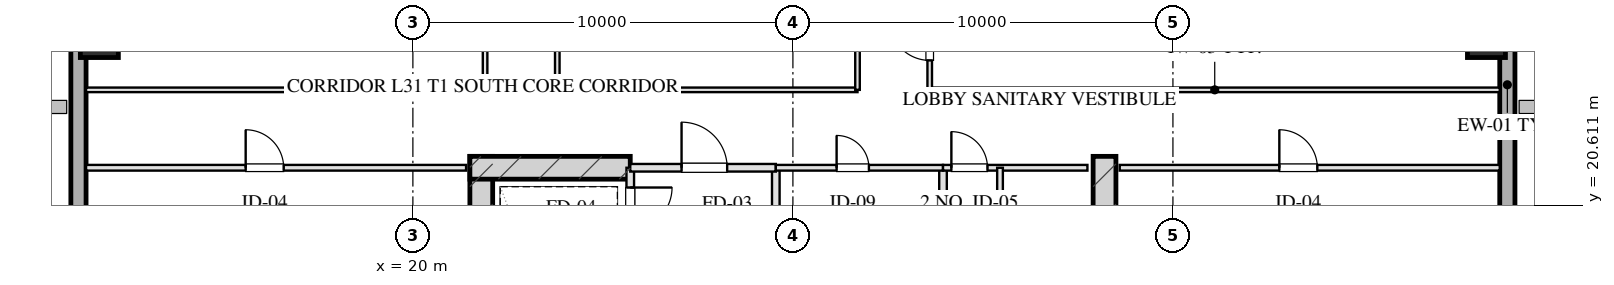
"""IFC4 building model, lengths in metres.
Left out: names, types, materials, properties, quantities, classifications, styles, units other than length and angle.
Written with IfcOpenShell. Run it as: python <this file> out.ifc"""

import sys

from ifc_helpers import new_model, si_unit, direction, frame, frame_2d, origin, origin_2d, place, context, subcontext, project, spatial, rectangle, hollow_rectangle, extrude, element, fill, save


model = new_model("IFC4")
c1 = context("Model", 3, precision=1e-05, world=origin(), true_north=direction((0.0, 1.0)))
c2 = subcontext(c1, "Body", "Model", "MODEL_VIEW")
j1 = project(units=[si_unit("LENGTHUNIT", "METRE"), si_unit("PLANEANGLEUNIT", "RADIAN")], contexts=[c1])
p1 = place(None, origin())
s1 = spatial("IfcSite", under=j1, at=p1, CompositionType="ELEMENT")
p2 = place(p1, origin())
s2 = spatial("IfcBuilding", under=s1, at=p2, CompositionType="ELEMENT")
p3 = place(p2, frame((0.0, 0.0, 120.75)))
s3 = spatial("IfcBuildingStorey", under=s2, at=p3, CompositionType="ELEMENT", Elevation=120.75)
for number, where, z_axis, x_axis in (
    (1, (21.8, 21.9, 0.0), (0.0, 0.0, 1.0), (0.0, -1.0, 0.0)),
    (2, (38.2, 21.9, 0.0), (0.0, 0.0, 1.0), (0.0, -1.0, 0.0)),
):
    element("IfcWall", number, at=place(p3, frame(where, z_axis=z_axis, x_axis=x_axis)), inside=s3, PredefinedType="SHEAR", context=c2, shape_type="SweptSolid", body=[
        extrude(rectangle(XDim=9.48, YDim=0.6, at=frame_2d((4.74, 0.0))), origin(), (0.0, 0.0, 1.0), 3.45),
    ])
p4 = place(p3, frame((21.5, 21.6, 0.0), z_axis=(0.0, 0.0, 1.0), x_axis=(1.0, 0.0, 0.0)))
e3 = element("IfcWall", 3, at=p4, inside=s3, PredefinedType="SHEAR", context=c2, shape_type="SweptSolid", body=[
    extrude(rectangle(XDim=4.22, YDim=0.6, at=frame_2d((2.11, 0.0))), origin(), (0.0, 0.0, 1.0), 3.45),
])
for number, where, z_axis, x_axis in (
    (4, (11.75, 25.0, 0.0), (0.0, 0.0, 1.0), (1.0, 0.0, 0.0)),
    (5, (48.25, 25.0, 0.0), (0.0, 0.0, 1.0), (1.0, 0.0, 0.0)),
):
    element("IfcColumn", number, at=place(p3, frame(where, z_axis=z_axis, x_axis=x_axis)), inside=s3, PredefinedType="COLUMN", context=c2, shape_type="SweptSolid", body=[
        extrude(hollow_rectangle(XDim=1.0, YDim=1.0, WallThickness=0.036, at=origin_2d()), origin(), (0.0, 0.0, 1.0), 3.451),
    ])
p5 = place(p3, frame((11.2, 9.0, 0.0), z_axis=(0.0, 0.0, 1.0), x_axis=(0.0, 1.0, 0.0)))
e6 = element("IfcWall", 6, at=p5, inside=s3, PredefinedType="SOLIDWALL", context=c2, shape_type="SweptSolid", body=[
    extrude(rectangle(XDim=50.0, YDim=0.4, at=frame_2d((25.0, 0.0))), origin(), (0.0, 0.0, 1.0), 2.61),
])
p6 = place(p5, frame((17.4, 0.0, 0.75)))
e7 = element("IfcOpeningElement", 7, at=p6, cuts=e6, PredefinedType="OPENING", context=c2, shape_type="SweptSolid", body=[
    extrude(rectangle(XDim=2.4, YDim=1.46, at=frame_2d((1.2, 0.73))), frame((0.0, 0.21, 0.0), z_axis=(0.0, -1.0, 0.0), x_axis=(1.0, 0.0, 0.0)), (0.0, 0.0, 1.0), 0.42),
])
p7 = place(p5, frame((30.25, 0.0, 0.0)))
e8 = element("IfcOpeningElement", 8, at=p7, cuts=e6, PredefinedType="OPENING", context=c2, shape_type="SweptSolid", body=[
    extrude(rectangle(XDim=1.1, YDim=2.15, at=frame_2d((0.55, 1.075))), frame((0.0, 0.21, 0.0), z_axis=(0.0, -1.0, 0.0), x_axis=(1.0, 0.0, 0.0)), (0.0, 0.0, 1.0), 0.42),
])
p8 = place(p3, frame((48.8, 59.0, 0.0), z_axis=(0.0, 0.0, 1.0), x_axis=(0.0, -1.0, 0.0)))
e9 = element("IfcWall", 9, at=p8, inside=s3, PredefinedType="SOLIDWALL", context=c2, shape_type="SweptSolid", body=[
    extrude(rectangle(XDim=50.0, YDim=0.4, at=frame_2d((25.0, 0.0))), origin(), (0.0, 0.0, 1.0), 2.61),
])
p9 = place(p8, frame((18.583, 0.0, 0.0)))
e10 = element("IfcOpeningElement", 10, at=p9, cuts=e9, PredefinedType="OPENING", context=c2, shape_type="SweptSolid", body=[
    extrude(rectangle(XDim=1.1, YDim=2.15, at=frame_2d((0.55, 1.075))), frame((0.0, 0.21, 0.0), z_axis=(0.0, -1.0, 0.0), x_axis=(1.0, 0.0, 0.0)), (0.0, 0.0, 1.0), 0.42),
])
p10 = place(p3, frame((25.72, 21.6, 0.0), z_axis=(0.0, 0.0, 1.0), x_axis=(0.0, -1.0, 0.0)))
e11 = element("IfcWall", 11, at=p10, inside=s3, PredefinedType="PARTITIONING", context=c2, shape_type="SweptSolid", body=[
    extrude(rectangle(XDim=1.9, YDim=0.2, at=frame_2d((0.95, 0.0))), origin(), (0.0, 0.0, 1.0), 3.175),
])
p11 = place(p10, frame((0.52, 0.0, 0.0)))
e12 = element("IfcOpeningElement", 12, at=p11, cuts=e11, PredefinedType="OPENING", context=c2, shape_type="SweptSolid", body=[
    extrude(rectangle(XDim=1.1, YDim=2.05, at=frame_2d((0.55, 1.025))), frame((0.0, 0.11, 0.0), z_axis=(0.0, -1.0, 0.0), x_axis=(1.0, 0.0, 0.0)), (0.0, 0.0, 1.0), 0.22),
])
p12 = place(p3, frame((29.55, 21.6, 0.0), z_axis=(0.0, 0.0, 1.0), x_axis=(0.0, -1.0, 0.0)))
e13 = element("IfcWall", 13, at=p12, inside=s3, PredefinedType="PARTITIONING", context=c2, shape_type="SweptSolid", body=[
    extrude(rectangle(XDim=8.43, YDim=0.2, at=frame_2d((4.215, 0.0))), origin(), (0.0, 0.0, 1.0), 3.175),
])
p13 = place(p3, frame((25.72, 21.6, 0.0), z_axis=(0.0, 0.0, 1.0), x_axis=(1.0, 0.0, 0.0)))
e14 = element("IfcWall", 14, at=p13, inside=s3, PredefinedType="PARTITIONING", context=c2, shape_type="SweptSolid", body=[
    extrude(rectangle(XDim=3.83, YDim=0.2, at=frame_2d((1.915, 0.0))), origin(), (0.0, 0.0, 1.0), 3.175),
])
p14 = place(p13, frame((1.35, 0.0, 0.0)))
e15 = element("IfcOpeningElement", 15, at=p14, cuts=e14, PredefinedType="OPENING", context=c2, shape_type="SweptSolid", body=[
    extrude(rectangle(XDim=1.2, YDim=2.05, at=frame_2d((0.6, 1.025))), frame((0.0, 0.11, 0.0), z_axis=(0.0, -1.0, 0.0), x_axis=(1.0, 0.0, 0.0)), (0.0, 0.0, 1.0), 0.22),
])
p15 = place(p3, frame((33.95, 21.6, 0.0), z_axis=(0.0, 0.0, 1.0), x_axis=(0.0, -1.0, 0.0)))
e16 = element("IfcWall", 16, at=p15, inside=s3, PredefinedType="PARTITIONING", context=c2, shape_type="SweptSolid", body=[
    extrude(rectangle(XDim=8.43, YDim=0.2, at=frame_2d((4.215, 0.0))), origin(), (0.0, 0.0, 1.0), 3.175),
])
p16 = place(p3, frame((29.55, 21.6, 0.0), z_axis=(0.0, 0.0, 1.0), x_axis=(1.0, 0.0, 0.0)))
e17 = element("IfcWall", 17, at=p16, inside=s3, PredefinedType="PARTITIONING", context=c2, shape_type="SweptSolid", body=[
    extrude(rectangle(XDim=4.4, YDim=0.15, at=frame_2d((2.2, 0.0))), origin(), (0.0, 0.0, 1.0), 3.175),
])
p17 = place(p16, frame((1.6, 0.0, 0.0)))
e18 = element("IfcOpeningElement", 18, at=p17, cuts=e17, PredefinedType="OPENING", context=c2, shape_type="SweptSolid", body=[
    extrude(rectangle(XDim=0.85, YDim=2.05, at=frame_2d((0.425, 1.025))), frame((0.0, 0.085, 0.0), z_axis=(0.0, -1.0, 0.0), x_axis=(1.0, 0.0, 0.0)), (0.0, 0.0, 1.0), 0.17),
])
p18 = place(p3, frame((33.95, 21.6, 0.0), z_axis=(0.0, 0.0, 1.0), x_axis=(1.0, 0.0, 0.0)))
e19 = element("IfcWall", 19, at=p18, inside=s3, PredefinedType="PARTITIONING", context=c2, shape_type="SweptSolid", body=[
    extrude(rectangle(XDim=3.8, YDim=0.15, at=frame_2d((1.9, 0.0))), origin(), (0.0, 0.0, 1.0), 3.175),
])
p19 = place(p18, frame((0.22, 0.0, 0.0)))
e20 = element("IfcOpeningElement", 20, at=p19, cuts=e19, PredefinedType="OPENING", context=c2, shape_type="SweptSolid", body=[
    extrude(rectangle(XDim=0.95, YDim=2.05, at=frame_2d((0.475, 1.025))), frame((0.0, 0.085, 0.0), z_axis=(0.0, -1.0, 0.0), x_axis=(1.0, 0.0, 0.0)), (0.0, 0.0, 1.0), 0.17),
])
p20 = place(p3, frame((35.45, 21.6, 0.0), z_axis=(0.0, 0.0, 1.0), x_axis=(0.0, -1.0, 0.0)))
e21 = element("IfcWall", 21, at=p20, inside=s3, PredefinedType="PARTITIONING", context=c2, shape_type="SweptSolid", body=[
    extrude(rectangle(XDim=8.43, YDim=0.15, at=frame_2d((4.215, 0.0))), origin(), (0.0, 0.0, 1.0), 2.815),
])
p21 = place(p20, frame((2.55, 0.0, 0.0)))
e22 = element("IfcOpeningElement", 22, at=p21, cuts=e21, PredefinedType="OPENING", context=c2, shape_type="SweptSolid", body=[
    extrude(rectangle(XDim=0.95, YDim=2.05, at=frame_2d((0.475, 1.025))), frame((0.0, 0.085, 0.0), z_axis=(0.0, -1.0, 0.0), x_axis=(1.0, 0.0, 0.0)), (0.0, 0.0, 1.0), 0.17),
])
p22 = place(p20, frame((4.7, 0.0, 0.0)))
e23 = element("IfcOpeningElement", 23, at=p22, cuts=e21, PredefinedType="OPENING", context=c2, shape_type="SweptSolid", body=[
    extrude(rectangle(XDim=0.9, YDim=2.05, at=frame_2d((0.45, 1.025))), frame((0.0, 0.085, 0.0), z_axis=(0.0, -1.0, 0.0), x_axis=(1.0, 0.0, 0.0)), (0.0, 0.0, 1.0), 0.17),
])
p23 = place(p20, frame((6.8, 0.0, 0.0)))
e24 = element("IfcOpeningElement", 24, at=p23, cuts=e21, PredefinedType="OPENING", context=c2, shape_type="SweptSolid", body=[
    extrude(rectangle(XDim=0.9, YDim=2.05, at=frame_2d((0.45, 1.025))), frame((0.0, 0.085, 0.0), z_axis=(0.0, -1.0, 0.0), x_axis=(1.0, 0.0, 0.0)), (0.0, 0.0, 1.0), 0.17),
])
p24 = place(p3, frame((11.4, 21.6, 0.0), z_axis=(0.0, 0.0, 1.0), x_axis=(1.0, 0.0, 0.0)))
e25 = element("IfcWall", 25, at=p24, inside=s3, PredefinedType="PARTITIONING", context=c2, shape_type="SweptSolid", body=[
    extrude(rectangle(XDim=10.0, YDim=0.15, at=frame_2d((5.0, 0.0))), origin(), (0.0, 0.0, 1.0), 3.175),
])
p25 = place(p24, frame((4.2, 0.0, 0.0)))
e26 = element("IfcOpeningElement", 26, at=p25, cuts=e25, PredefinedType="OPENING", context=c2, shape_type="SweptSolid", body=[
    extrude(rectangle(XDim=1.0, YDim=2.05, at=frame_2d((0.5, 1.025))), frame((0.0, 0.085, 0.0), z_axis=(0.0, -1.0, 0.0), x_axis=(1.0, 0.0, 0.0)), (0.0, 0.0, 1.0), 0.17),
])
p26 = place(p3, frame((38.6, 21.6, 0.0), z_axis=(0.0, 0.0, 1.0), x_axis=(1.0, 0.0, 0.0)))
e27 = element("IfcWall", 27, at=p26, inside=s3, PredefinedType="PARTITIONING", context=c2, shape_type="SweptSolid", body=[
    extrude(rectangle(XDim=10.0, YDim=0.15, at=frame_2d((5.0, 0.0))), origin(), (0.0, 0.0, 1.0), 3.175),
])
p27 = place(p26, frame((4.2, 0.0, 0.0)))
e28 = element("IfcOpeningElement", 28, at=p27, cuts=e27, PredefinedType="OPENING", context=c2, shape_type="SweptSolid", body=[
    extrude(rectangle(XDim=1.0, YDim=2.05, at=frame_2d((0.5, 1.025))), frame((0.0, 0.085, 0.0), z_axis=(0.0, -1.0, 0.0), x_axis=(1.0, 0.0, 0.0)), (0.0, 0.0, 1.0), 0.17),
])
p28 = place(p3, frame((11.4, 23.65, 0.0), z_axis=(0.0, 0.0, 1.0), x_axis=(1.0, 0.0, 0.0)))
e29 = element("IfcWall", 29, at=p28, inside=s3, PredefinedType="PARTITIONING", context=c2, shape_type="SweptSolid", body=[
    extrude(rectangle(XDim=10.5, YDim=0.12, at=frame_2d((5.25, 0.0))), origin(), (0.0, 0.0, 1.0), 3.175),
])
p29 = place(p3, frame((23.8, 23.65, 0.0), z_axis=(0.0, 0.0, 1.0), x_axis=(1.0, 0.0, 0.0)))
e30 = element("IfcWall", 30, at=p29, inside=s3, PredefinedType="PARTITIONING", context=c2, shape_type="SweptSolid", body=[
    extrude(rectangle(XDim=7.9, YDim=0.12, at=frame_2d((3.95, 0.0))), origin(), (0.0, 0.0, 1.0), 3.175),
])
p30 = place(p3, frame((33.6, 23.65, 0.0), z_axis=(0.0, 0.0, 1.0), x_axis=(1.0, 0.0, 0.0)))
e31 = element("IfcWall", 31, at=p30, inside=s3, PredefinedType="PARTITIONING", context=c2, shape_type="SweptSolid", body=[
    extrude(rectangle(XDim=15.0, YDim=0.12, at=frame_2d((7.5, 0.0))), origin(), (0.0, 0.0, 1.0), 3.175),
])
p31 = place(p3, frame((21.9, 23.65, 0.0), z_axis=(0.0, 0.0, 1.0), x_axis=(0.0, 1.0, 0.0)))
e32 = element("IfcWall", 32, at=p31, inside=s3, PredefinedType="PARTITIONING", context=c2, shape_type="SweptSolid", body=[
    extrude(rectangle(XDim=20.7, YDim=0.12, at=frame_2d((10.35, 0.0))), origin(), (0.0, 0.0, 1.0), 3.175),
])
p32 = place(p31, frame((2.675, 0.0, 0.0)))
e33 = element("IfcOpeningElement", 33, at=p32, cuts=e32, PredefinedType="OPENING", context=c2, shape_type="SweptSolid", body=[
    extrude(rectangle(XDim=1.0, YDim=2.05, at=frame_2d((0.5, 1.025))), frame((0.0, 0.07, 0.0), z_axis=(0.0, -1.0, 0.0), x_axis=(1.0, 0.0, 0.0)), (0.0, 0.0, 1.0), 0.14),
])
p33 = place(p31, frame((9.85, 0.0, 0.0)))
e34 = element("IfcOpeningElement", 34, at=p33, cuts=e32, PredefinedType="OPENING", context=c2, shape_type="SweptSolid", body=[
    extrude(rectangle(XDim=1.0, YDim=2.05, at=frame_2d((0.5, 1.025))), frame((0.0, 0.07, 0.0), z_axis=(0.0, -1.0, 0.0), x_axis=(1.0, 0.0, 0.0)), (0.0, 0.0, 1.0), 0.14),
])
p34 = place(p31, frame((17.025, 0.0, 0.0)))
e35 = element("IfcOpeningElement", 35, at=p34, cuts=e32, PredefinedType="OPENING", context=c2, shape_type="SweptSolid", body=[
    extrude(rectangle(XDim=1.0, YDim=2.05, at=frame_2d((0.5, 1.025))), frame((0.0, 0.07, 0.0), z_axis=(0.0, -1.0, 0.0), x_axis=(1.0, 0.0, 0.0)), (0.0, 0.0, 1.0), 0.14),
])
p35 = place(p3, frame((23.8, 23.65, 0.0), z_axis=(0.0, 0.0, 1.0), x_axis=(0.0, 1.0, 0.0)))
e36 = element("IfcWall", 36, at=p35, inside=s3, PredefinedType="PARTITIONING", context=c2, shape_type="SweptSolid", body=[
    extrude(rectangle(XDim=20.7, YDim=0.12, at=frame_2d((10.35, 0.0))), origin(), (0.0, 0.0, 1.0), 3.175),
])
p36 = place(p35, frame((2.857, 0.0, 0.0)))
e37 = element("IfcOpeningElement", 37, at=p36, cuts=e36, PredefinedType="OPENING", context=c2, shape_type="SweptSolid", body=[
    extrude(rectangle(XDim=1.1, YDim=2.05, at=frame_2d((0.55, 1.025))), frame((0.0, 0.07, 0.0), z_axis=(0.0, -1.0, 0.0), x_axis=(1.0, 0.0, 0.0)), (0.0, 0.0, 1.0), 0.14),
])
p37 = place(p35, frame((17.189, 0.0, 0.0)))
e38 = element("IfcOpeningElement", 38, at=p37, cuts=e36, PredefinedType="OPENING", context=c2, shape_type="SweptSolid", body=[
    extrude(rectangle(XDim=1.1, YDim=2.05, at=frame_2d((0.55, 1.025))), frame((0.0, 0.07, 0.0), z_axis=(0.0, -1.0, 0.0), x_axis=(1.0, 0.0, 0.0)), (0.0, 0.0, 1.0), 0.14),
])
p38 = place(p3, frame((31.7, 23.65, 0.0), z_axis=(0.0, 0.0, 1.0), x_axis=(0.0, 1.0, 0.0)))
e39 = element("IfcWall", 39, at=p38, inside=s3, PredefinedType="PARTITIONING", context=c2, shape_type="SweptSolid", body=[
    extrude(rectangle(XDim=20.7, YDim=0.12, at=frame_2d((10.35, 0.0))), origin(), (0.0, 0.0, 1.0), 3.175),
])
p39 = place(p38, frame((9.696, 0.0, 0.0)))
e40 = element("IfcOpeningElement", 40, at=p39, cuts=e39, PredefinedType="OPENING", context=c2, shape_type="SweptSolid", body=[
    extrude(rectangle(XDim=1.1, YDim=2.05, at=frame_2d((0.55, 1.025))), frame((0.0, 0.07, 0.0), z_axis=(0.0, -1.0, 0.0), x_axis=(1.0, 0.0, 0.0)), (0.0, 0.0, 1.0), 0.14),
])
p40 = place(p3, frame((33.6, 23.65, 0.0), z_axis=(0.0, 0.0, 1.0), x_axis=(0.0, 1.0, 0.0)))
e41 = element("IfcWall", 41, at=p40, inside=s3, PredefinedType="PARTITIONING", context=c2, shape_type="SweptSolid", body=[
    extrude(rectangle(XDim=20.7, YDim=0.12, at=frame_2d((10.35, 0.0))), origin(), (0.0, 0.0, 1.0), 3.175),
])
p41 = place(p40, frame((0.775, 0.0, 0.0)))
e42 = element("IfcOpeningElement", 42, at=p41, cuts=e41, PredefinedType="OPENING", context=c2, shape_type="SweptSolid", body=[
    extrude(rectangle(XDim=1.05, YDim=2.05, at=frame_2d((0.525, 1.025))), frame((0.0, 0.07, 0.0), z_axis=(0.0, -1.0, 0.0), x_axis=(1.0, 0.0, 0.0)), (0.0, 0.0, 1.0), 0.14),
])
p42 = place(p40, frame((3.95, 0.0, 0.0)))
e43 = element("IfcOpeningElement", 43, at=p42, cuts=e41, PredefinedType="OPENING", context=c2, shape_type="SweptSolid", body=[
    extrude(rectangle(XDim=1.0, YDim=2.05, at=frame_2d((0.5, 1.025))), frame((0.0, 0.07, 0.0), z_axis=(0.0, -1.0, 0.0), x_axis=(1.0, 0.0, 0.0)), (0.0, 0.0, 1.0), 0.14),
])
p43 = place(p40, frame((8.19, 0.0, 0.0)))
e44 = element("IfcOpeningElement", 44, at=p43, cuts=e41, PredefinedType="OPENING", context=c2, shape_type="SweptSolid", body=[
    extrude(rectangle(XDim=1.0, YDim=2.05, at=frame_2d((0.5, 1.025))), frame((0.0, 0.07, 0.0), z_axis=(0.0, -1.0, 0.0), x_axis=(1.0, 0.0, 0.0)), (0.0, 0.0, 1.0), 0.14),
])
p44 = place(p40, frame((12.257, 0.0, 0.0)))
e45 = element("IfcOpeningElement", 45, at=p44, cuts=e41, PredefinedType="OPENING", context=c2, shape_type="SweptSolid", body=[
    extrude(rectangle(XDim=0.85, YDim=2.05, at=frame_2d((0.425, 1.025))), frame((0.0, 0.07, 0.0), z_axis=(0.0, -1.0, 0.0), x_axis=(1.0, 0.0, 0.0)), (0.0, 0.0, 1.0), 0.14),
])
p45 = place(p40, frame((15.816, 0.0, 0.0)))
e46 = element("IfcOpeningElement", 46, at=p45, cuts=e41, PredefinedType="OPENING", context=c2, shape_type="SweptSolid", body=[
    extrude(rectangle(XDim=1.0, YDim=2.05, at=frame_2d((0.5, 1.025))), frame((0.0, 0.07, 0.0), z_axis=(0.0, -1.0, 0.0), x_axis=(1.0, 0.0, 0.0)), (0.0, 0.0, 1.0), 0.14),
])
p46 = place(p40, frame((18.925, 0.0, 0.0)))
e47 = element("IfcOpeningElement", 47, at=p46, cuts=e41, PredefinedType="OPENING", context=c2, shape_type="SweptSolid", body=[
    extrude(rectangle(XDim=1.0, YDim=2.05, at=frame_2d((0.5, 1.025))), frame((0.0, 0.07, 0.0), z_axis=(0.0, -1.0, 0.0), x_axis=(1.0, 0.0, 0.0)), (0.0, 0.0, 1.0), 0.14),
])
p47 = place(p11, origin())
e48 = element("IfcDoor", 48, at=p47, inside=s3, OperationType="SINGLE_SWING_LEFT", PredefinedType="DOOR", context=c2, shape_type="SweptSolid", body=[
    extrude(rectangle(XDim=1.1, YDim=2.05, at=frame_2d((0.55, 1.025))), frame((0.0, 0.025, 0.0), z_axis=(0.0, -1.0, 0.0), x_axis=(1.0, 0.0, 0.0)), (0.0, 0.0, 1.0), 0.05),
])
fill(e12, e48)
p48 = place(p14, origin())
e49 = element("IfcDoor", 49, at=p48, inside=s3, OperationType="SINGLE_SWING_LEFT", PredefinedType="DOOR", context=c2, shape_type="SweptSolid", body=[
    extrude(rectangle(XDim=1.2, YDim=2.05, at=frame_2d((0.6, 1.025))), frame((0.0, 0.025, 0.0), z_axis=(0.0, -1.0, 0.0), x_axis=(1.0, 0.0, 0.0)), (0.0, 0.0, 1.0), 0.05),
])
fill(e15, e49)
p49 = place(p17, origin())
e50 = element("IfcDoor", 50, at=p49, inside=s3, OperationType="SINGLE_SWING_LEFT", PredefinedType="DOOR", context=c2, shape_type="SweptSolid", body=[
    extrude(rectangle(XDim=0.85, YDim=2.05, at=frame_2d((0.425, 1.025))), frame((0.0, 0.025, 0.0), z_axis=(0.0, -1.0, 0.0), x_axis=(1.0, 0.0, 0.0)), (0.0, 0.0, 1.0), 0.05),
])
fill(e18, e50)
p50 = place(p19, origin())
e51 = element("IfcDoor", 51, at=p50, inside=s3, OperationType="SINGLE_SWING_LEFT", PredefinedType="DOOR", context=c2, shape_type="SweptSolid", body=[
    extrude(rectangle(XDim=0.95, YDim=2.05, at=frame_2d((0.475, 1.025))), frame((0.0, 0.025, 0.0), z_axis=(0.0, -1.0, 0.0), x_axis=(1.0, 0.0, 0.0)), (0.0, 0.0, 1.0), 0.05),
])
fill(e20, e51)
p51 = place(p25, origin())
e52 = element("IfcDoor", 52, at=p51, inside=s3, OperationType="SINGLE_SWING_LEFT", PredefinedType="DOOR", context=c2, shape_type="SweptSolid", body=[
    extrude(rectangle(XDim=1.0, YDim=2.05, at=frame_2d((0.5, 1.025))), frame((0.0, 0.025, 0.0), z_axis=(0.0, -1.0, 0.0), x_axis=(1.0, 0.0, 0.0)), (0.0, 0.0, 1.0), 0.05),
])
fill(e26, e52)
p52 = place(p27, origin())
e53 = element("IfcDoor", 53, at=p52, inside=s3, OperationType="SINGLE_SWING_LEFT", PredefinedType="DOOR", context=c2, shape_type="SweptSolid", body=[
    extrude(rectangle(XDim=1.0, YDim=2.05, at=frame_2d((0.5, 1.025))), frame((0.0, 0.025, 0.0), z_axis=(0.0, -1.0, 0.0), x_axis=(1.0, 0.0, 0.0)), (0.0, 0.0, 1.0), 0.05),
])
fill(e28, e53)
p53 = place(p41, origin())
e54 = element("IfcDoor", 54, at=p53, inside=s3, OperationType="SINGLE_SWING_RIGHT", PredefinedType="DOOR", context=c2, shape_type="SweptSolid", body=[
    extrude(rectangle(XDim=1.05, YDim=2.05, at=frame_2d((0.525, 1.025))), frame((0.0, 0.025, 0.0), z_axis=(0.0, -1.0, 0.0), x_axis=(1.0, 0.0, 0.0)), (0.0, 0.0, 1.0), 0.05),
])
fill(e42, e54)
save(model, sys.argv[1])
